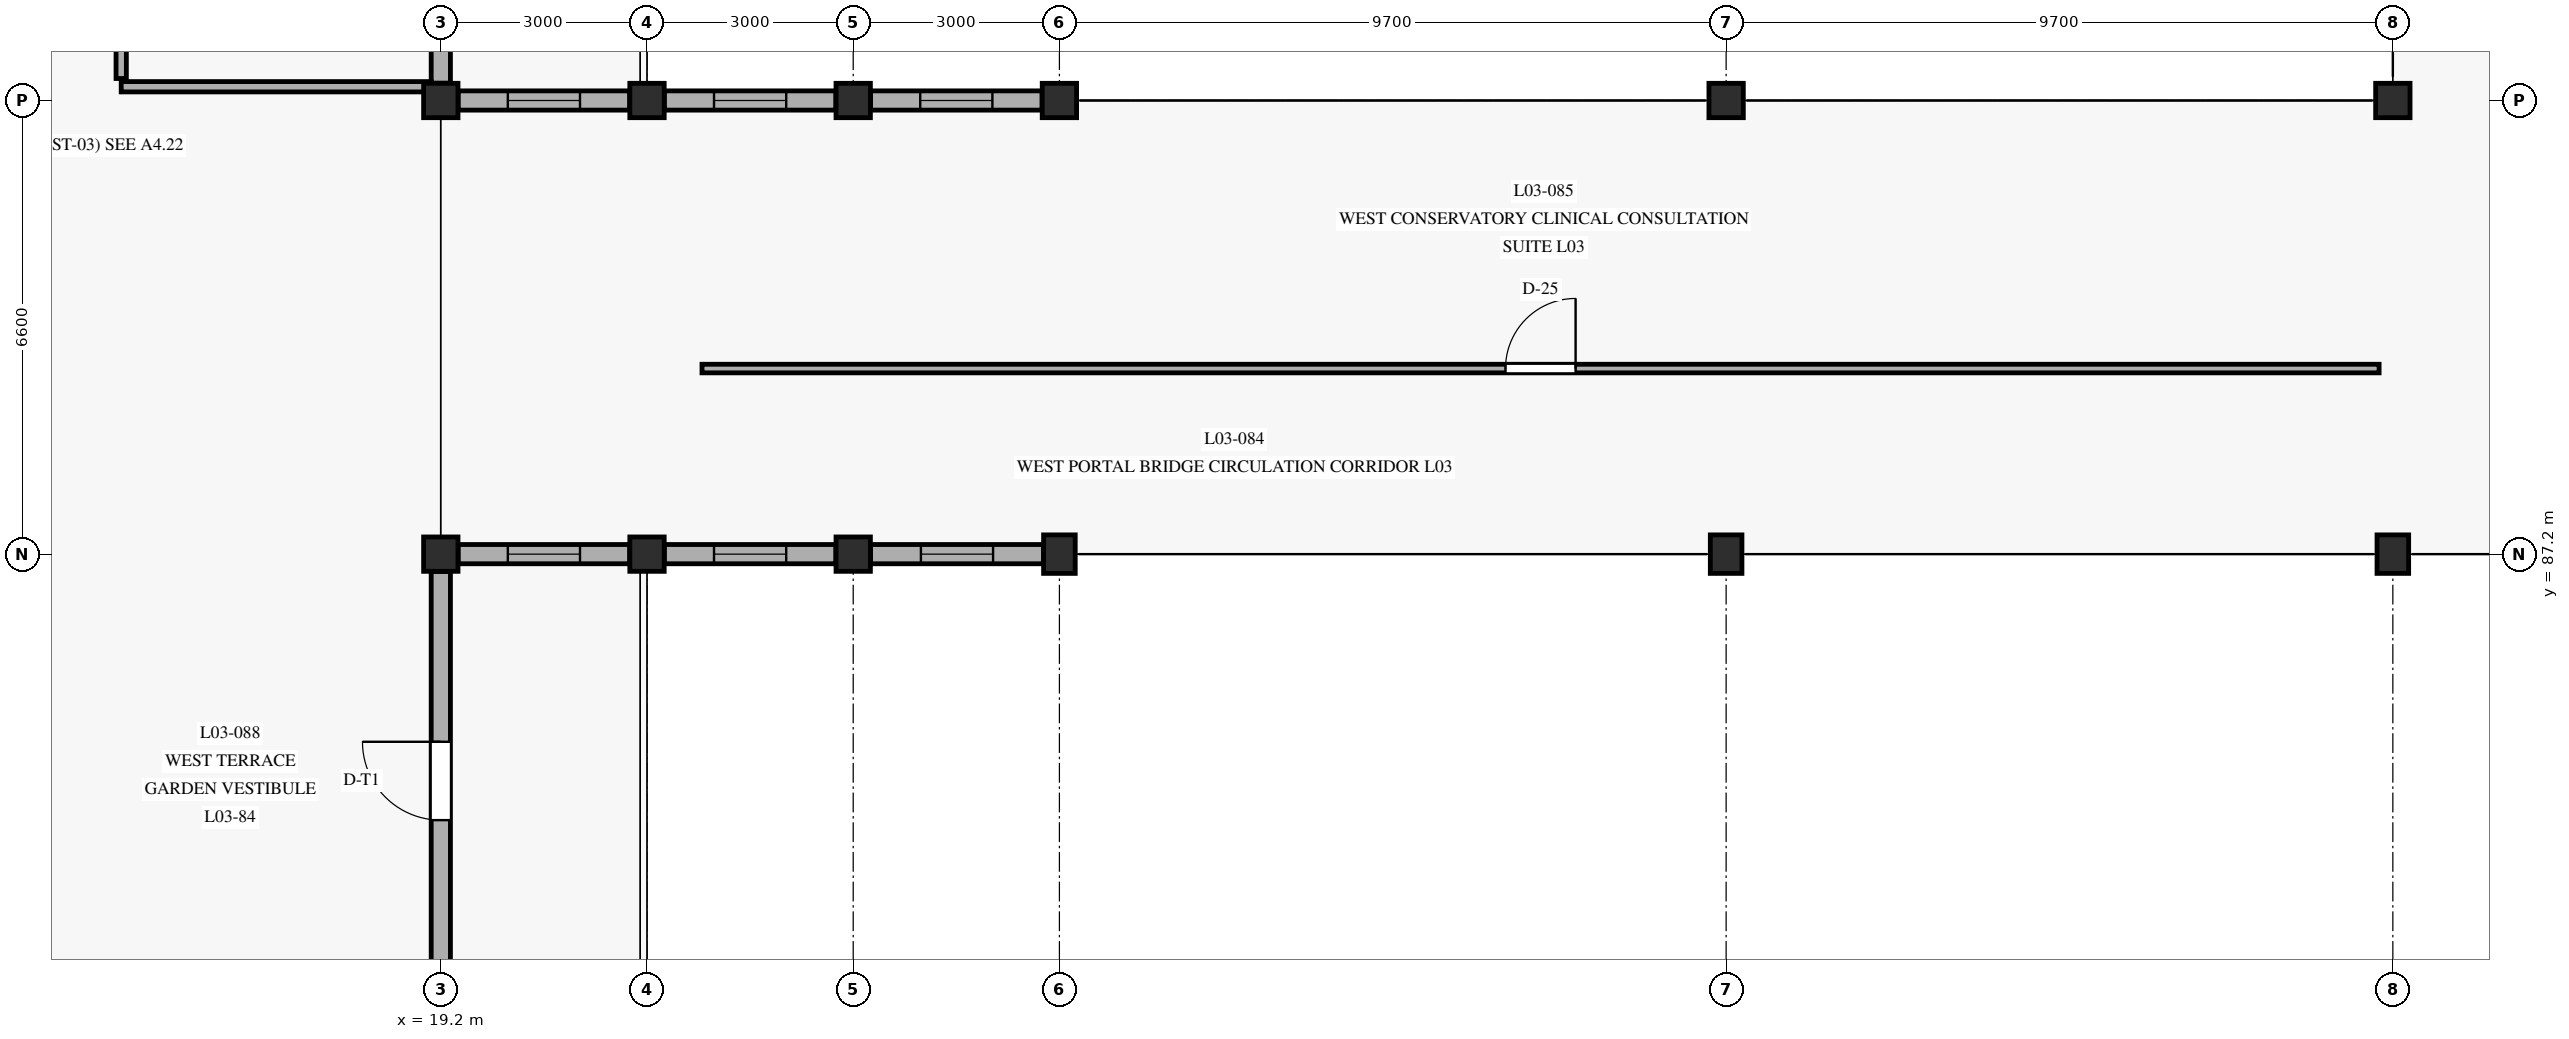
"""IFC4 building model, lengths in metres.
Left out: names, types, materials, properties, quantities, classifications, styles, units other than length and angle.
Written with IfcOpenShell. Run it as: python <this file> out.ifc"""

import sys

from ifc_helpers import new_model, si_unit, direction, frame, frame_2d, origin, origin_with_axes, origin_2d, place, context, subcontext, project, spatial, rectangle, extrude, element, fill, save


model = new_model("IFC4")
c1 = context("Model", 3, precision=1e-05, world=origin(), true_north=direction((0.0, 1.0)))
c2 = subcontext(c1, "Body", "Model", "MODEL_VIEW")
j1 = project(units=[si_unit("LENGTHUNIT", "METRE"), si_unit("PLANEANGLEUNIT", "RADIAN")], contexts=[c1])
p1 = place(None, origin())
s1 = spatial("IfcSite", under=j1, at=p1, CompositionType="ELEMENT")
p2 = place(p1, origin())
s2 = spatial("IfcBuilding", under=s1, at=p2, CompositionType="ELEMENT")
p3 = place(p2, frame((0.0, 0.0, 9.3)))
s3 = spatial("IfcBuildingStorey", under=s2, at=p3, CompositionType="ELEMENT", Elevation=9.3)
for number, where, z_axis, x_axis in (
    (1, (19.2, 87.2, 0.0), (0.0, 0.0, 1.0), (1.0, 0.0, 0.0)),
    (2, (19.2, 93.8, 0.0), (0.0, 0.0, 1.0), (1.0, 0.0, 0.0)),
    (3, (22.2, 87.2, 0.0), (0.0, 0.0, 1.0), (1.0, 0.0, 0.0)),
    (4, (22.2, 93.8, 0.0), (0.0, 0.0, 1.0), (1.0, 0.0, 0.0)),
    (5, (25.2, 87.2, 0.0), (0.0, 0.0, 1.0), (1.0, 0.0, 0.0)),
    (6, (25.2, 93.8, 0.0), (0.0, 0.0, 1.0), (1.0, 0.0, 0.0)),
):
    element("IfcColumn", number, at=place(p3, frame(where, z_axis=z_axis, x_axis=x_axis)), inside=s3, PredefinedType="COLUMN", context=c2, shape_type="SweptSolid", body=[
        extrude(rectangle(XDim=0.5, YDim=0.5, at=origin_2d()), origin(), (0.0, 0.0, 1.0), 4.2),
    ])
p4 = place(p3, frame((28.2, 87.2, 0.0), z_axis=(0.0, 0.0, 1.0), x_axis=(1.0, 0.0, 0.0)))
e7 = element("IfcColumn", 7, at=p4, inside=s3, PredefinedType="COLUMN", context=c2, shape_type="SweptSolid", body=[
    extrude(rectangle(XDim=0.46, YDim=0.56, at=origin_2d()), origin(), (0.0, 0.0, 1.0), 4.2),
])
p5 = place(p3, frame((28.2, 93.8, 0.0), z_axis=(0.0, 0.0, 1.0), x_axis=(1.0, 0.0, 0.0)))
e8 = element("IfcColumn", 8, at=p5, inside=s3, PredefinedType="COLUMN", context=c2, shape_type="SweptSolid", body=[
    extrude(rectangle(XDim=0.5, YDim=0.5, at=origin_2d()), origin(), (0.0, 0.0, 1.0), 4.2),
])
p6 = place(p3, frame((37.9, 87.2, 0.0), z_axis=(0.0, 0.0, 1.0), x_axis=(1.0, 0.0, 0.0)))
e9 = element("IfcColumn", 9, at=p6, inside=s3, PredefinedType="COLUMN", context=c2, shape_type="SweptSolid", body=[
    extrude(rectangle(XDim=0.46, YDim=0.56, at=origin_2d()), origin(), (0.0, 0.0, 1.0), 4.2),
])
p7 = place(p3, frame((37.9, 93.8, 0.0), z_axis=(0.0, 0.0, 1.0), x_axis=(1.0, 0.0, 0.0)))
e10 = element("IfcColumn", 10, at=p7, inside=s3, PredefinedType="COLUMN", context=c2, shape_type="SweptSolid", body=[
    extrude(rectangle(XDim=0.5, YDim=0.5, at=origin_2d()), origin(), (0.0, 0.0, 1.0), 4.2),
])
p8 = place(p3, frame((47.6, 87.2, 0.0), z_axis=(0.0, 0.0, 1.0), x_axis=(1.0, 0.0, 0.0)))
e11 = element("IfcColumn", 11, at=p8, inside=s3, PredefinedType="COLUMN", context=c2, shape_type="SweptSolid", body=[
    extrude(rectangle(XDim=0.46, YDim=0.56, at=origin_2d()), origin(), (0.0, 0.0, 1.0), 4.2),
])
p9 = place(p3, frame((47.6, 93.8, 0.0), z_axis=(0.0, 0.0, 1.0), x_axis=(1.0, 0.0, 0.0)))
e12 = element("IfcColumn", 12, at=p9, inside=s3, PredefinedType="COLUMN", context=c2, shape_type="SweptSolid", body=[
    extrude(rectangle(XDim=0.5, YDim=0.5, at=origin_2d()), origin(), (0.0, 0.0, 1.0), 4.2),
])
p10 = place(p3, frame((19.2, 80.852, 0.0), z_axis=(0.0, 0.0, 1.0), x_axis=(0.0, 1.0, 0.0)))
e13 = element("IfcWall", 13, at=p10, inside=s3, PredefinedType="SOLIDWALL", context=c2, shape_type="SweptSolid", body=[
    extrude(rectangle(XDim=6.096, YDim=0.28, at=frame_2d((3.048, 0.0))), origin(), (0.0, 0.0, 1.0), 3.57),
])
p11 = place(p10, frame((2.478, 0.0, 0.0)))
e14 = element("IfcOpeningElement", 14, at=p11, cuts=e13, PredefinedType="OPENING", context=c2, shape_type="SweptSolid", body=[
    extrude(rectangle(XDim=1.14, YDim=2.3, at=frame_2d((0.57, 1.15))), frame((0.0, 0.15, 0.0), z_axis=(0.0, -1.0, 0.0), x_axis=(1.0, 0.0, 0.0)), (0.0, 0.0, 1.0), 0.3),
])
p12 = place(p3, frame((19.2, 94.052, 0.0), z_axis=(0.0, 0.0, 1.0), x_axis=(0.0, 1.0, 0.0)))
e15 = element("IfcWall", 15, at=p12, inside=s3, PredefinedType="SOLIDWALL", context=c2, shape_type="SweptSolid", body=[
    extrude(rectangle(XDim=6.096, YDim=0.28, at=frame_2d((3.048, 0.0))), origin(), (0.0, 0.0, 1.0), 3.57),
])
p13 = place(p12, frame((3.16, 0.0, 0.8)))
e16 = element("IfcOpeningElement", 16, at=p13, cuts=e15, PredefinedType="OPENING", context=c2, shape_type="SweptSolid", body=[
    extrude(rectangle(XDim=2.05, YDim=1.95, at=frame_2d((1.025, 0.975))), frame((0.0, 0.15, 0.0), z_axis=(0.0, -1.0, 0.0), x_axis=(1.0, 0.0, 0.0)), (0.0, 0.0, 1.0), 0.3),
])
p14 = place(p3, frame((19.452, 87.2, 0.0), z_axis=(0.0, 0.0, 1.0), x_axis=(1.0, 0.0, 0.0)))
e17 = element("IfcWall", 17, at=p14, inside=s3, PredefinedType="SOLIDWALL", context=c2, shape_type="SweptSolid", body=[
    extrude(rectangle(XDim=2.496, YDim=0.28, at=frame_2d((1.248, 0.0))), origin(), (0.0, 0.0, 1.0), 3.59),
])
p15 = place(p14, frame((0.723, 0.0, 0.85)))
e18 = element("IfcOpeningElement", 18, at=p15, cuts=e17, PredefinedType="OPENING", context=c2, shape_type="SweptSolid", body=[
    extrude(rectangle(XDim=1.05, YDim=2.2, at=frame_2d((0.525, 1.1))), frame((0.0, 0.15, 0.0), z_axis=(0.0, -1.0, 0.0), x_axis=(1.0, 0.0, 0.0)), (0.0, 0.0, 1.0), 0.3),
])
p16 = place(p3, frame((21.948, 93.8, 0.0), z_axis=(0.0, 0.0, 1.0), x_axis=(-1.0, 0.0, 0.0)))
e19 = element("IfcWall", 19, at=p16, inside=s3, PredefinedType="SOLIDWALL", context=c2, shape_type="SweptSolid", body=[
    extrude(rectangle(XDim=2.496, YDim=0.28, at=frame_2d((1.248, 0.0))), origin(), (0.0, 0.0, 1.0), 3.59),
])
p17 = place(p16, frame((0.723, 0.0, 0.85)))
e20 = element("IfcOpeningElement", 20, at=p17, cuts=e19, PredefinedType="OPENING", context=c2, shape_type="SweptSolid", body=[
    extrude(rectangle(XDim=1.05, YDim=2.2, at=frame_2d((0.525, 1.1))), frame((0.0, 0.15, 0.0), z_axis=(0.0, -1.0, 0.0), x_axis=(1.0, 0.0, 0.0)), (0.0, 0.0, 1.0), 0.3),
])
p18 = place(p3, frame((22.452, 87.2, 0.0), z_axis=(0.0, 0.0, 1.0), x_axis=(1.0, 0.0, 0.0)))
e21 = element("IfcWall", 21, at=p18, inside=s3, PredefinedType="SOLIDWALL", context=c2, shape_type="SweptSolid", body=[
    extrude(rectangle(XDim=2.496, YDim=0.28, at=frame_2d((1.248, 0.0))), origin(), (0.0, 0.0, 1.0), 3.59),
])
p19 = place(p18, frame((0.723, 0.0, 0.85)))
e22 = element("IfcOpeningElement", 22, at=p19, cuts=e21, PredefinedType="OPENING", context=c2, shape_type="SweptSolid", body=[
    extrude(rectangle(XDim=1.05, YDim=2.2, at=frame_2d((0.525, 1.1))), frame((0.0, 0.15, 0.0), z_axis=(0.0, -1.0, 0.0), x_axis=(1.0, 0.0, 0.0)), (0.0, 0.0, 1.0), 0.3),
])
p20 = place(p3, frame((24.948, 93.8, 0.0), z_axis=(0.0, 0.0, 1.0), x_axis=(-1.0, 0.0, 0.0)))
e23 = element("IfcWall", 23, at=p20, inside=s3, PredefinedType="SOLIDWALL", context=c2, shape_type="SweptSolid", body=[
    extrude(rectangle(XDim=2.496, YDim=0.28, at=frame_2d((1.248, 0.0))), origin(), (0.0, 0.0, 1.0), 3.59),
])
p21 = place(p20, frame((0.723, 0.0, 0.85)))
e24 = element("IfcOpeningElement", 24, at=p21, cuts=e23, PredefinedType="OPENING", context=c2, shape_type="SweptSolid", body=[
    extrude(rectangle(XDim=1.05, YDim=2.2, at=frame_2d((0.525, 1.1))), frame((0.0, 0.15, 0.0), z_axis=(0.0, -1.0, 0.0), x_axis=(1.0, 0.0, 0.0)), (0.0, 0.0, 1.0), 0.3),
])
p22 = place(p3, frame((25.452, 87.2, 0.0), z_axis=(0.0, 0.0, 1.0), x_axis=(1.0, 0.0, 0.0)))
e25 = element("IfcWall", 25, at=p22, inside=s3, PredefinedType="SOLIDWALL", context=c2, shape_type="SweptSolid", body=[
    extrude(rectangle(XDim=2.516, YDim=0.28, at=frame_2d((1.258, 0.0))), origin(), (0.0, 0.0, 1.0), 3.59),
])
p23 = place(p22, frame((0.733, 0.0, 0.85)))
e26 = element("IfcOpeningElement", 26, at=p23, cuts=e25, PredefinedType="OPENING", context=c2, shape_type="SweptSolid", body=[
    extrude(rectangle(XDim=1.05, YDim=2.2, at=frame_2d((0.525, 1.1))), frame((0.0, 0.15, 0.0), z_axis=(0.0, -1.0, 0.0), x_axis=(1.0, 0.0, 0.0)), (0.0, 0.0, 1.0), 0.3),
])
p24 = place(p3, frame((27.948, 93.8, 0.0), z_axis=(0.0, 0.0, 1.0), x_axis=(-1.0, 0.0, 0.0)))
e27 = element("IfcWall", 27, at=p24, inside=s3, PredefinedType="SOLIDWALL", context=c2, shape_type="SweptSolid", body=[
    extrude(rectangle(XDim=2.496, YDim=0.28, at=frame_2d((1.248, 0.0))), origin(), (0.0, 0.0, 1.0), 3.59),
])
p25 = place(p24, frame((0.723, 0.0, 0.85)))
e28 = element("IfcOpeningElement", 28, at=p25, cuts=e27, PredefinedType="OPENING", context=c2, shape_type="SweptSolid", body=[
    extrude(rectangle(XDim=1.05, YDim=2.2, at=frame_2d((0.525, 1.1))), frame((0.0, 0.15, 0.0), z_axis=(0.0, -1.0, 0.0), x_axis=(1.0, 0.0, 0.0)), (0.0, 0.0, 1.0), 0.3),
])
p26 = place(p3, frame((23.0, 89.9, 0.0), z_axis=(0.0, 0.0, 1.0), x_axis=(1.0, 0.0, 0.0)))
e29 = element("IfcWall", 29, at=p26, inside=s3, PredefinedType="PARTITIONING", context=c2, shape_type="SweptSolid", body=[
    extrude(rectangle(XDim=24.4, YDim=0.125, at=frame_2d((12.2, 0.0))), origin(), (0.0, 0.0, 1.0), 3.485),
])
p27 = place(p26, frame((11.69, 0.0, 0.0)))
e30 = element("IfcOpeningElement", 30, at=p27, cuts=e29, PredefinedType="OPENING", context=c2, shape_type="SweptSolid", body=[
    extrude(rectangle(XDim=1.02, YDim=2.18, at=frame_2d((0.51, 1.09))), frame((0.0, 0.073, 0.0), z_axis=(0.0, -1.0, 0.0), x_axis=(1.0, 0.0, 0.0)), (0.0, 0.0, 1.0), 0.145),
])
p28 = place(p3, frame((14.55, 94.12, 0.0), z_axis=(0.0, 0.0, 1.0), x_axis=(0.0, 1.0, 0.0)))
e31 = element("IfcWall", 31, at=p28, inside=s3, PredefinedType="PARTITIONING", context=c2, shape_type="SweptSolid", body=[
    extrude(rectangle(XDim=2.11, YDim=0.15, at=frame_2d((1.055, 0.0))), origin(), (0.0, 0.0, 1.0), 3.495),
])
p29 = place(p28, frame((0.615, 0.0, 0.0)))
e32 = element("IfcOpeningElement", 32, at=p29, cuts=e31, PredefinedType="OPENING", context=c2, shape_type="SweptSolid", body=[
    extrude(rectangle(XDim=0.88, YDim=2.1, at=frame_2d((0.44, 1.05))), frame((0.0, 0.085, 0.0), z_axis=(0.0, -1.0, 0.0), x_axis=(1.0, 0.0, 0.0)), (0.0, 0.0, 1.0), 0.17),
])
p30 = place(p3, frame((14.55, 94.0, 0.0), z_axis=(0.0, 0.0, 1.0), x_axis=(1.0, 0.0, 0.0)))
e33 = element("IfcWall", 33, at=p30, inside=s3, PredefinedType="PARTITIONING", context=c2, shape_type="SweptSolid", body=[
    extrude(rectangle(XDim=4.51, YDim=0.15, at=frame_2d((2.255, 0.0))), origin(), (0.0, 0.0, 1.0), 3.495),
])
p31 = place(p11, frame((1.14, 0.0, 0.0), z_axis=(0.0, 0.0, 1.0), x_axis=(-1.0, 0.0, 0.0)))
e34 = element("IfcDoor", 34, at=p31, inside=s3, OperationType="SINGLE_SWING_LEFT", PredefinedType="DOOR", context=c2, shape_type="SweptSolid", body=[
    extrude(rectangle(XDim=1.14, YDim=2.3, at=frame_2d((0.57, 1.15))), frame((0.0, 0.025, 0.0), z_axis=(0.0, -1.0, 0.0), x_axis=(1.0, 0.0, 0.0)), (0.0, 0.0, 1.0), 0.05),
])
fill(e14, e34)
p32 = place(p15, origin_with_axes())
e35 = element("IfcWindow", 35, at=p32, inside=s3, PartitioningType="SINGLE_PANEL", PredefinedType="WINDOW", context=c2, shape_type="SweptSolid", body=[
    extrude(rectangle(XDim=1.05, YDim=2.2, at=frame_2d((0.525, 1.1))), frame((0.0, 0.03, 0.0), z_axis=(0.0, -1.0, 0.0), x_axis=(1.0, 0.0, 0.0)), (0.0, 0.0, 1.0), 0.06),
])
fill(e18, e35)
p33 = place(p17, origin_with_axes())
e36 = element("IfcWindow", 36, at=p33, inside=s3, PartitioningType="SINGLE_PANEL", PredefinedType="WINDOW", context=c2, shape_type="SweptSolid", body=[
    extrude(rectangle(XDim=1.05, YDim=2.2, at=frame_2d((0.525, 1.1))), frame((0.0, 0.03, 0.0), z_axis=(0.0, -1.0, 0.0), x_axis=(1.0, 0.0, 0.0)), (0.0, 0.0, 1.0), 0.06),
])
fill(e20, e36)
p34 = place(p19, origin_with_axes())
e37 = element("IfcWindow", 37, at=p34, inside=s3, PartitioningType="SINGLE_PANEL", PredefinedType="WINDOW", context=c2, shape_type="SweptSolid", body=[
    extrude(rectangle(XDim=1.05, YDim=2.2, at=frame_2d((0.525, 1.1))), frame((0.0, 0.03, 0.0), z_axis=(0.0, -1.0, 0.0), x_axis=(1.0, 0.0, 0.0)), (0.0, 0.0, 1.0), 0.06),
])
fill(e22, e37)
p35 = place(p21, origin_with_axes())
e38 = element("IfcWindow", 38, at=p35, inside=s3, PartitioningType="SINGLE_PANEL", PredefinedType="WINDOW", context=c2, shape_type="SweptSolid", body=[
    extrude(rectangle(XDim=1.05, YDim=2.2, at=frame_2d((0.525, 1.1))), frame((0.0, 0.03, 0.0), z_axis=(0.0, -1.0, 0.0), x_axis=(1.0, 0.0, 0.0)), (0.0, 0.0, 1.0), 0.06),
])
fill(e24, e38)
p36 = place(p23, origin_with_axes())
e39 = element("IfcWindow", 39, at=p36, inside=s3, PartitioningType="SINGLE_PANEL", PredefinedType="WINDOW", context=c2, shape_type="SweptSolid", body=[
    extrude(rectangle(XDim=1.05, YDim=2.2, at=frame_2d((0.525, 1.1))), frame((0.0, 0.03, 0.0), z_axis=(0.0, -1.0, 0.0), x_axis=(1.0, 0.0, 0.0)), (0.0, 0.0, 1.0), 0.06),
])
fill(e26, e39)
p37 = place(p25, origin_with_axes())
e40 = element("IfcWindow", 40, at=p37, inside=s3, PartitioningType="SINGLE_PANEL", PredefinedType="WINDOW", context=c2, shape_type="SweptSolid", body=[
    extrude(rectangle(XDim=1.05, YDim=2.2, at=frame_2d((0.525, 1.1))), frame((0.0, 0.03, 0.0), z_axis=(0.0, -1.0, 0.0), x_axis=(1.0, 0.0, 0.0)), (0.0, 0.0, 1.0), 0.06),
])
fill(e28, e40)
p38 = place(p27, origin_with_axes())
e41 = element("IfcDoor", 41, at=p38, inside=s3, OperationType="SINGLE_SWING_RIGHT", PredefinedType="DOOR", context=c2, shape_type="SweptSolid", body=[
    extrude(rectangle(XDim=1.02, YDim=2.18, at=frame_2d((0.51, 1.09))), frame((0.0, 0.025, 0.0), z_axis=(0.0, -1.0, 0.0), x_axis=(1.0, 0.0, 0.0)), (0.0, 0.0, 1.0), 0.05),
])
fill(e30, e41)
save(model, sys.argv[1])
